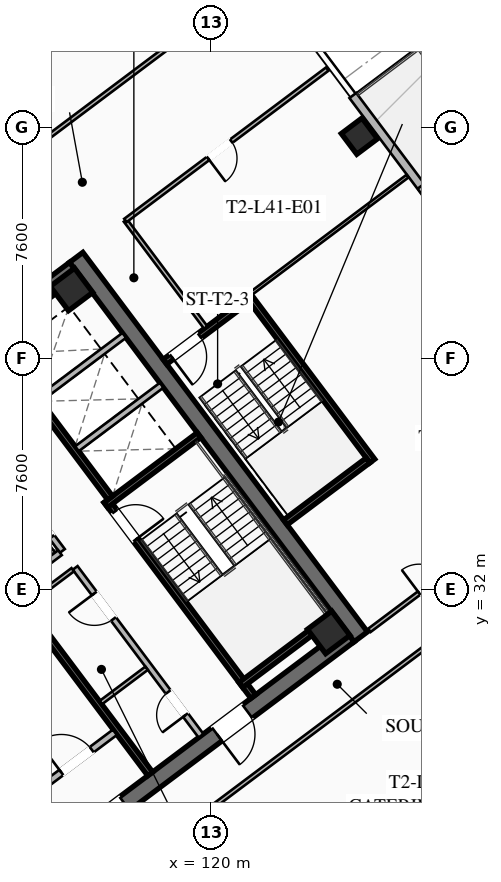
"""IFC4 building model, lengths in metres.
Left out: names, types, materials, properties, quantities, classifications, styles, units other than length and angle.
Written with IfcOpenShell. Run it as: python <this file> out.ifc"""

import sys

from ifc_helpers import new_model, si_unit, direction, frame, frame_2d, origin, origin_2d, place, context, subcontext, project, spatial, rectangle, hollow_rectangle, extrude, element, fill, save


model = new_model("IFC4")
c1 = context("Model", 3, precision=1e-05, world=origin(), true_north=direction((0.0, 1.0)))
c2 = subcontext(c1, "Body", "Model", "MODEL_VIEW")
j1 = project(units=[si_unit("LENGTHUNIT", "METRE"), si_unit("PLANEANGLEUNIT", "RADIAN")], contexts=[c1])
p1 = place(None, origin())
s1 = spatial("IfcSite", under=j1, at=p1, CompositionType="ELEMENT")
p2 = place(p1, origin())
s2 = spatial("IfcBuilding", under=s1, at=p2, CompositionType="ELEMENT")
p3 = place(p2, frame((0.0, 0.0, 153.45)))
s3 = spatial("IfcBuildingStorey", under=s2, at=p3, CompositionType="ELEMENT", Elevation=153.45)
p4 = place(p3, frame((115.564, 42.923, 0.0), z_axis=(0.0, 0.0, 1.0), x_axis=(0.600005007985, -0.799996243986, 0.0)))
e1 = element("IfcWall", 1, at=p4, inside=s3, PredefinedType="SHEAR", context=c2, shape_type="SweptSolid", body=[
    extrude(rectangle(XDim=15.6, YDim=0.55, at=frame_2d((7.8, 0.0))), origin(), (0.0, 0.0, 1.0), 3.55),
])
p5 = place(p3, frame((124.539, 30.498, 0.0), z_axis=(0.0, 0.0, 1.0), x_axis=(-0.799998054672, -0.600002593761, 0.0)))
e2 = element("IfcWall", 2, at=p5, inside=s3, PredefinedType="SHEAR", context=c2, shape_type="SweptSolid", body=[
    extrude(rectangle(XDim=15.06, YDim=0.55, at=frame_2d((7.53, 0.0))), origin(), (0.0, 0.0, 1.0), 3.55),
])
p6 = place(p5, frame((9.23, 0.0, 0.0)))
e3 = element("IfcOpeningElement", 3, at=p6, cuts=e2, PredefinedType="OPENING", context=c2, shape_type="SweptSolid", body=[
    extrude(rectangle(XDim=1.25, YDim=2.25, at=frame_2d((0.625, 1.125))), frame((0.0, 0.285, 0.0), z_axis=(0.0, -1.0, 0.0), x_axis=(1.0, 0.0, 0.0)), (0.0, 0.0, 1.0), 0.57),
])
p7 = place(p5, frame((4.18, 0.0, 0.0)))
e4 = element("IfcOpeningElement", 4, at=p7, cuts=e2, PredefinedType="OPENING", context=c2, shape_type="SweptSolid", body=[
    extrude(rectangle(XDim=1.25, YDim=2.25, at=frame_2d((0.625, 1.125))), frame((0.0, 0.285, 0.0), z_axis=(0.0, -1.0, 0.0), x_axis=(1.0, 0.0, 0.0)), (0.0, 0.0, 1.0), 0.57),
])
p8 = place(p3, frame((103.461, 33.502, 0.0), z_axis=(0.0, 0.0, 1.0), x_axis=(0.799998054672, 0.600002593761, 0.0)))
e5 = element("IfcWall", 5, at=p8, inside=s3, PredefinedType="SHEAR", context=c2, shape_type="SweptSolid", body=[
    extrude(rectangle(XDim=15.06, YDim=0.55, at=frame_2d((7.53, 0.0))), origin(), (0.0, 0.0, 1.0), 3.55),
])
p9 = place(p8, frame((4.58, 0.0, 0.0)))
e6 = element("IfcOpeningElement", 6, at=p9, cuts=e5, PredefinedType="OPENING", context=c2, shape_type="SweptSolid", body=[
    extrude(rectangle(XDim=1.25, YDim=2.25, at=frame_2d((0.625, 1.125))), frame((0.0, 0.285, 0.0), z_axis=(0.0, -1.0, 0.0), x_axis=(1.0, 0.0, 0.0)), (0.0, 0.0, 1.0), 0.57),
])
p10 = place(p8, frame((9.63, 0.0, 0.0)))
e7 = element("IfcOpeningElement", 7, at=p10, cuts=e5, PredefinedType="OPENING", context=c2, shape_type="SweptSolid", body=[
    extrude(rectangle(XDim=1.25, YDim=2.25, at=frame_2d((0.625, 1.125))), frame((0.0, 0.285, 0.0), z_axis=(0.0, -1.0, 0.0), x_axis=(1.0, 0.0, 0.0)), (0.0, 0.0, 1.0), 0.57),
])
for number, where, z_axis, x_axis in (
    (8, (123.87, 30.59, 0.0), (0.0, 0.0, 1.0), (0.8, 0.6, 0.0)),
    (9, (115.41, 41.87, 0.0), (0.0, 0.0, 1.0), (0.8, 0.6, 0.0)),
):
    element("IfcColumn", number, at=place(p3, frame(where, z_axis=z_axis, x_axis=x_axis)), inside=s3, PredefinedType="COLUMN", context=c2, shape_type="SweptSolid", body=[
        extrude(hollow_rectangle(XDim=1.0, YDim=1.0, WallThickness=0.04, at=origin_2d()), origin(), (0.0, 0.0, 1.0), 3.37),
    ])
p11 = place(p3, frame((124.88, 46.91, 0.0), z_axis=(0.0, 0.0, 1.0), x_axis=(0.799999996291, 0.600000004945, 0.0)))
e10 = element("IfcColumn", 10, at=p11, inside=s3, PredefinedType="COLUMN", context=c2, shape_type="SweptSolid", body=[
    extrude(hollow_rectangle(XDim=0.85, YDim=0.85, WallThickness=0.035, at=origin_2d()), origin(), (0.0, 0.0, 1.0), 3.37),
])
p12 = place(p3, frame((124.664, 48.248, 0.0), z_axis=(0.0, 0.0, 1.0), x_axis=(0.599994081423, -0.800004438899, 0.0)))
e11 = element("IfcWall", 11, at=p12, inside=s3, PredefinedType="SOLIDWALL", context=c2, shape_type="SweptSolid", body=[
    extrude(rectangle(XDim=13.2, YDim=0.28, at=frame_2d((6.6, 0.0))), origin(), (0.0, 0.0, 1.0), 3.37),
])
p13 = place(p12, frame((5.95, 0.0, 0.0)))
e12 = element("IfcOpeningElement", 12, at=p13, cuts=e11, PredefinedType="OPENING", context=c2, shape_type="SweptSolid", body=[
    extrude(rectangle(XDim=1.3, YDim=2.15, at=frame_2d((0.65, 1.075))), frame((0.0, 0.15, 0.0), z_axis=(0.0, -1.0, 0.0), x_axis=(1.0, 0.0, 0.0)), (0.0, 0.0, 1.0), 0.3),
])
p14 = place(p12, frame((3.732, 0.0, 0.85)))
e13 = element("IfcOpeningElement", 13, at=p14, cuts=e11, PredefinedType="OPENING", context=c2, shape_type="SweptSolid", body=[
    extrude(rectangle(XDim=1.8, YDim=1.92, at=frame_2d((0.9, 0.96))), frame((0.0, 0.15, 0.0), z_axis=(0.0, -1.0, 0.0), x_axis=(1.0, 0.0, 0.0)), (0.0, 0.0, 1.0), 0.3),
])
p15 = place(p12, frame((7.668, 0.0, 0.85)))
e14 = element("IfcOpeningElement", 14, at=p15, cuts=e11, PredefinedType="OPENING", context=c2, shape_type="SweptSolid", body=[
    extrude(rectangle(XDim=1.8, YDim=1.92, at=frame_2d((0.9, 0.96))), frame((0.0, 0.15, 0.0), z_axis=(0.0, -1.0, 0.0), x_axis=(1.0, 0.0, 0.0)), (0.0, 0.0, 1.0), 0.3),
])
p16 = place(p3, frame((116.56, 34.92, 0.0), z_axis=(0.0, 0.0, 1.0), x_axis=(0.59999029481, -0.8000072788, 0.0)))
e15 = element("IfcWall", 15, at=p16, inside=s3, PredefinedType="SHEAR", context=c2, shape_type="SweptSolid", body=[
    extrude(rectangle(XDim=8.05, YDim=0.2, at=frame_2d((4.025, 0.0))), origin(), (0.0, 0.0, 1.0), 3.37),
])
p17 = place(p16, frame((0.45, 0.0, 0.0)))
e16 = element("IfcOpeningElement", 16, at=p17, cuts=e15, PredefinedType="OPENING", context=c2, shape_type="SweptSolid", body=[
    extrude(rectangle(XDim=1.15, YDim=2.2, at=frame_2d((0.575, 1.1))), frame((0.0, 0.11, 0.0), z_axis=(0.0, -1.0, 0.0), x_axis=(1.0, 0.0, 0.0)), (0.0, 0.0, 1.0), 0.22),
])
for number, where, z_axis, x_axis in (
    (17, (116.54, 34.78, 0.0), (0.0, 0.0, 1.0), (0.8, 0.6, 0.0)),
    (18, (120.98, 28.86, 0.0), (0.0, 0.0, 1.0), (0.8, 0.6, 0.0)),
):
    element("IfcWall", number, at=place(p3, frame(where, z_axis=z_axis, x_axis=x_axis)), inside=s3, PredefinedType="SHEAR", context=c2, shape_type="SweptSolid", body=[
        extrude(rectangle(XDim=3.83, YDim=0.2, at=frame_2d((1.915, 0.0))), origin(), (0.0, 0.0, 1.0), 3.37),
    ])
p18 = place(p3, frame((117.998, 25.936, 0.0), z_axis=(0.0, 0.0, 1.0), x_axis=(-0.600002693989, 0.799997979501, 0.0)))
e19 = element("IfcWall", 19, at=p18, inside=s3, PredefinedType="SHEAR", context=c2, shape_type="SweptSolid", body=[
    extrude(rectangle(XDim=14.5, YDim=0.2, at=frame_2d((7.25, 0.0))), origin(), (0.0, 0.0, 1.0), 3.37),
])
p19 = place(p3, frame((114.316, 25.412, 0.0), z_axis=(0.0, 0.0, 1.0), x_axis=(0.800018601094, 0.59997519774, 0.0)))
e20 = element("IfcWall", 20, at=p19, inside=s3, PredefinedType="SOLIDWALL", context=c2, shape_type="SweptSolid", body=[
    extrude(rectangle(XDim=3.15, YDim=0.22, at=frame_2d((1.575, 0.0))), origin(), (0.0, 0.0, 1.0), 2.513),
])
p20 = place(p19, frame((0.95, 0.0, 0.0)))
e21 = element("IfcOpeningElement", 21, at=p20, cuts=e20, PredefinedType="OPENING", context=c2, shape_type="SweptSolid", body=[
    extrude(rectangle(XDim=1.25, YDim=2.25, at=frame_2d((0.625, 1.125))), frame((0.0, 0.12, 0.0), z_axis=(0.0, -1.0, 0.0), x_axis=(1.0, 0.0, 0.0)), (0.0, 0.0, 1.0), 0.24),
])
p21 = place(p3, frame((115.19, 23.83, 0.0), z_axis=(0.0, 0.0, 1.0), x_axis=(-0.599993943644, 0.800004542231, 0.0)))
e22 = element("IfcWall", 22, at=p21, inside=s3, PredefinedType="SHEAR", context=c2, shape_type="SweptSolid", body=[
    extrude(rectangle(XDim=6.45, YDim=0.2, at=frame_2d((3.225, 0.0))), origin(), (0.0, 0.0, 1.0), 3.37),
])
p22 = place(p21, frame((4.875, 0.0, 0.0)))
e23 = element("IfcOpeningElement", 23, at=p22, cuts=e22, PredefinedType="OPENING", context=c2, shape_type="SweptSolid", body=[
    extrude(rectangle(XDim=1.3, YDim=2.25, at=frame_2d((0.65, 1.125))), frame((0.0, 0.11, 0.0), z_axis=(0.0, -1.0, 0.0), x_axis=(1.0, 0.0, 0.0)), (0.0, 0.0, 1.0), 0.22),
])
p23 = place(p21, frame((2.875, 0.0, 0.0)))
e24 = element("IfcOpeningElement", 24, at=p23, cuts=e22, PredefinedType="OPENING", context=c2, shape_type="SweptSolid", body=[
    extrude(rectangle(XDim=1.3, YDim=2.25, at=frame_2d((0.65, 1.125))), frame((0.0, 0.11, 0.0), z_axis=(0.0, -1.0, 0.0), x_axis=(1.0, 0.0, 0.0)), (0.0, 0.0, 1.0), 0.22),
])
p24 = place(p21, frame((0.675, 0.0, 0.0)))
e25 = element("IfcOpeningElement", 25, at=p24, cuts=e22, PredefinedType="OPENING", context=c2, shape_type="SweptSolid", body=[
    extrude(rectangle(XDim=1.3, YDim=2.25, at=frame_2d((0.65, 1.125))), frame((0.0, 0.11, 0.0), z_axis=(0.0, -1.0, 0.0), x_axis=(1.0, 0.0, 0.0)), (0.0, 0.0, 1.0), 0.22),
])
p25 = place(p3, frame((112.81, 40.17, 0.0), z_axis=(0.0, 0.0, 1.0), x_axis=(0.599993943644, -0.800004542231, 0.0)))
e26 = element("IfcWall", 26, at=p25, inside=s3, PredefinedType="SHEAR", context=c2, shape_type="SweptSolid", body=[
    extrude(rectangle(XDim=6.45, YDim=0.2, at=frame_2d((3.225, 0.0))), origin(), (0.0, 0.0, 1.0), 3.37),
])
for number, where, z_axis, x_axis in (
    (27, (115.59, 36.63, 0.0), (0.0, 0.0, 1.0), (0.8, 0.6, 0.0)),
    (28, (114.36, 38.27, 0.0), (0.0, 0.0, 1.0), (0.8, 0.6, 0.0)),
):
    element("IfcWall", number, at=place(p3, frame(where, z_axis=z_axis, x_axis=x_axis)), inside=s3, PredefinedType="SOLIDWALL", context=c2, shape_type="SweptSolid", body=[
        extrude(rectangle(XDim=3.48, YDim=0.2, at=frame_2d((1.74, 0.0))), origin(), (0.0, 0.0, 1.0), 3.37),
    ])
p26 = place(p3, frame((119.67, 27.19, 0.0), z_axis=(0.0, 0.0, 1.0), x_axis=(-0.599988677396, 0.800008491828, 0.0)))
e29 = element("IfcWall", 29, at=p26, inside=s3, PredefinedType="SOLIDWALL", context=c2, shape_type="SweptSolid", body=[
    extrude(rectangle(XDim=6.9, YDim=0.2, at=frame_2d((3.45, 0.0))), origin(), (0.0, 0.0, 1.0), 2.513),
])
p27 = place(p26, frame((0.85, 0.0, 0.0)))
e30 = element("IfcOpeningElement", 30, at=p27, cuts=e29, PredefinedType="OPENING", context=c2, shape_type="SweptSolid", body=[
    extrude(rectangle(XDim=0.95, YDim=2.05, at=frame_2d((0.475, 1.025))), frame((0.0, 0.11, 0.0), z_axis=(0.0, -1.0, 0.0), x_axis=(1.0, 0.0, 0.0)), (0.0, 0.0, 1.0), 0.22),
])
p28 = place(p26, frame((4.8, 0.0, 0.0)))
e31 = element("IfcOpeningElement", 31, at=p28, cuts=e29, PredefinedType="OPENING", context=c2, shape_type="SweptSolid", body=[
    extrude(rectangle(XDim=1.05, YDim=2.2, at=frame_2d((0.525, 1.1))), frame((0.0, 0.11, 0.0), z_axis=(0.0, -1.0, 0.0), x_axis=(1.0, 0.0, 0.0)), (0.0, 0.0, 1.0), 0.22),
])
for number, where, z_axis, x_axis in (
    (32, (113.946, 31.522, 0.0), (0.0, 0.0, 1.0), (0.8, 0.6, 0.0)),
    (33, (116.376, 28.282, 0.0), (0.0, 0.0, 1.0), (0.8, 0.6, 0.0)),
):
    element("IfcWall", number, at=place(p3, frame(where, z_axis=z_axis, x_axis=x_axis)), inside=s3, PredefinedType="PARTITIONING", context=c2, shape_type="SweptSolid", body=[
        extrude(rectangle(XDim=1.88, YDim=0.135, at=frame_2d((0.94, 0.0))), origin(), (0.0, 0.0, 1.0), 2.513),
    ])
p29 = place(p3, frame((115.11, 33.27, 0.0), z_axis=(0.0, 0.0, 1.0), x_axis=(-0.600011322243, 0.799991508192, 0.0)))
e34 = element("IfcWall", 34, at=p29, inside=s3, PredefinedType="SOLIDWALL", context=c2, shape_type="SweptSolid", body=[
    extrude(rectangle(XDim=6.9, YDim=0.2, at=frame_2d((3.45, 0.0))), origin(), (0.0, 0.0, 1.0), 3.37),
])
p30 = place(p29, frame((0.575, 0.0, 0.0)))
e35 = element("IfcOpeningElement", 35, at=p30, cuts=e34, PredefinedType="OPENING", context=c2, shape_type="SweptSolid", body=[
    extrude(rectangle(XDim=1.1, YDim=2.2, at=frame_2d((0.55, 1.1))), frame((0.0, 0.11, 0.0), z_axis=(0.0, -1.0, 0.0), x_axis=(1.0, 0.0, 0.0)), (0.0, 0.0, 1.0), 0.22),
])
p31 = place(p29, frame((2.825, 0.0, 0.0)))
e36 = element("IfcOpeningElement", 36, at=p31, cuts=e34, PredefinedType="OPENING", context=c2, shape_type="SweptSolid", body=[
    extrude(rectangle(XDim=1.1, YDim=2.2, at=frame_2d((0.55, 1.1))), frame((0.0, 0.11, 0.0), z_axis=(0.0, -1.0, 0.0), x_axis=(1.0, 0.0, 0.0)), (0.0, 0.0, 1.0), 0.22),
])
p32 = place(p29, frame((5.075, 0.0, 0.0)))
e37 = element("IfcOpeningElement", 37, at=p32, cuts=e34, PredefinedType="OPENING", context=c2, shape_type="SweptSolid", body=[
    extrude(rectangle(XDim=1.1, YDim=2.2, at=frame_2d((0.55, 1.1))), frame((0.0, 0.11, 0.0), z_axis=(0.0, -1.0, 0.0), x_axis=(1.0, 0.0, 0.0)), (0.0, 0.0, 1.0), 0.22),
])
p33 = place(p3, frame((113.526, 32.082, 0.0), z_axis=(0.0, 0.0, 1.0), x_axis=(0.800046745961, 0.599937666993, 0.0)))
e38 = element("IfcWall", 38, at=p33, inside=s3, PredefinedType="SOLIDWALL", context=c2, shape_type="SweptSolid", body=[
    extrude(rectangle(XDim=1.88, YDim=0.2, at=frame_2d((0.94, 0.0))), origin(), (0.0, 0.0, 1.0), 3.37),
])
p34 = place(p3, frame((125.304, 36.228, 0.0), z_axis=(0.0, 0.0, 1.0), x_axis=(-0.59998851072, 0.800008616831, 0.0)))
e39 = element("IfcWall", 39, at=p34, inside=s3, PredefinedType="SHEAR", context=c2, shape_type="SweptSolid", body=[
    extrude(rectangle(XDim=6.8, YDim=0.2, at=frame_2d((3.4, 0.0))), origin(), (0.0, 0.0, 1.0), 3.37),
])
p35 = place(p3, frame((121.204, 41.528, 0.0), z_axis=(0.0, 0.0, 1.0), x_axis=(-0.800017232136, -0.599977023131, 0.0)))
e40 = element("IfcWall", 40, at=p35, inside=s3, PredefinedType="SHEAR", context=c2, shape_type="SweptSolid", body=[
    extrude(rectangle(XDim=3.4, YDim=0.2, at=frame_2d((1.7, 0.0))), origin(), (0.0, 0.0, 1.0), 3.37),
])
p36 = place(p35, frame((1.975, 0.0, 0.0)))
e41 = element("IfcOpeningElement", 41, at=p36, cuts=e40, PredefinedType="OPENING", context=c2, shape_type="SweptSolid", body=[
    extrude(rectangle(XDim=1.15, YDim=2.2, at=frame_2d((0.575, 1.1))), frame((0.0, 0.11, 0.0), z_axis=(0.0, -1.0, 0.0), x_axis=(1.0, 0.0, 0.0)), (0.0, 0.0, 1.0), 0.22),
])
p37 = place(p3, frame((122.444, 34.208, 0.0), z_axis=(0.0, 0.0, 1.0), x_axis=(0.79999138319, 0.600011488909, 0.0)))
e42 = element("IfcWall", 42, at=p37, inside=s3, PredefinedType="SHEAR", context=c2, shape_type="SweptSolid", body=[
    extrude(rectangle(XDim=3.4, YDim=0.2, at=frame_2d((1.7, 0.0))), origin(), (0.0, 0.0, 1.0), 3.37),
])
p38 = place(p3, frame((119.824, 40.618, 0.0), z_axis=(0.0, 0.0, 1.0), x_axis=(-0.599982243973, 0.800013316712, 0.0)))
e43 = element("IfcWall", 43, at=p38, inside=s3, PredefinedType="PARTITIONING", context=c2, shape_type="SweptSolid", body=[
    extrude(rectangle(XDim=4.4, YDim=0.135, at=frame_2d((2.2, 0.0))), origin(), (0.0, 0.0, 1.0), 2.513),
])
p39 = place(p3, frame((94.568, 31.826, 0.0), z_axis=(0.0, 0.0, 1.0), x_axis=(0.799997191971, 0.600003744021, 0.0)))
e44 = element("IfcWall", 44, at=p39, inside=s3, PredefinedType="PARTITIONING", context=c2, shape_type="SweptSolid", body=[
    extrude(rectangle(XDim=31.3, YDim=0.135, at=frame_2d((15.65, 0.0))), origin(), (0.0, 0.0, 1.0), 2.513),
])
p40 = place(p39, frame((0.3, 0.0, 0.0)))
e45 = element("IfcOpeningElement", 45, at=p40, cuts=e44, PredefinedType="OPENING", context=c2, shape_type="SweptSolid", body=[
    extrude(rectangle(XDim=0.95, YDim=2.05, at=frame_2d((0.475, 1.025))), frame((0.0, 0.077, 0.0), z_axis=(0.0, -1.0, 0.0), x_axis=(1.0, 0.0, 0.0)), (0.0, 0.0, 1.0), 0.155),
])
p41 = place(p3, frame((132.13, 33.91, 0.0), z_axis=(0.0, 0.0, 1.0), x_axis=(-0.799997191971, -0.600003744021, 0.0)))
e46 = element("IfcWall", 46, at=p41, inside=s3, PredefinedType="PARTITIONING", context=c2, shape_type="SweptSolid", body=[
    extrude(rectangle(XDim=31.3, YDim=0.135, at=frame_2d((15.65, 0.0))), origin(), (0.0, 0.0, 1.0), 2.513),
])
p42 = place(p41, frame((29.97, 0.0, 0.0)))
e47 = element("IfcOpeningElement", 47, at=p42, cuts=e46, PredefinedType="OPENING", context=c2, shape_type="SweptSolid", body=[
    extrude(rectangle(XDim=0.95, YDim=2.05, at=frame_2d((0.475, 1.025))), frame((0.0, 0.077, 0.0), z_axis=(0.0, -1.0, 0.0), x_axis=(1.0, 0.0, 0.0)), (0.0, 0.0, 1.0), 0.155),
])
p43 = place(p41, frame((0.38, 0.0, 0.0)))
e48 = element("IfcOpeningElement", 48, at=p43, cuts=e46, PredefinedType="OPENING", context=c2, shape_type="SweptSolid", body=[
    extrude(rectangle(XDim=0.95, YDim=2.05, at=frame_2d((0.475, 1.025))), frame((0.0, 0.077, 0.0), z_axis=(0.0, -1.0, 0.0), x_axis=(1.0, 0.0, 0.0)), (0.0, 0.0, 1.0), 0.155),
])
p44 = place(p3, frame((123.824, 49.118, 0.0), z_axis=(0.0, 0.0, 1.0), x_axis=(-0.799996470201, -0.60000470637, 0.0)))
e49 = element("IfcWall", 49, at=p44, inside=s3, PredefinedType="PARTITIONING", context=c2, shape_type="SweptSolid", body=[
    extrude(rectangle(XDim=8.3, YDim=0.135, at=frame_2d((4.15, 0.0))), origin(), (0.0, 0.0, 1.0), 2.513),
])
p45 = place(p44, frame((3.95, 0.0, 0.0)))
e50 = element("IfcOpeningElement", 50, at=p45, cuts=e49, PredefinedType="OPENING", context=c2, shape_type="SweptSolid", body=[
    extrude(rectangle(XDim=0.95, YDim=2.05, at=frame_2d((0.475, 1.025))), frame((0.0, 0.077, 0.0), z_axis=(0.0, -1.0, 0.0), x_axis=(1.0, 0.0, 0.0)), (0.0, 0.0, 1.0), 0.155),
])
p46 = place(p3, frame((125.208, 30.656, 0.0), z_axis=(0.0, 0.0, 1.0), x_axis=(0.800005876956, 0.599992163979, 0.0)))
e51 = element("IfcWall", 51, at=p46, inside=s3, PredefinedType="PARTITIONING", context=c2, shape_type="SweptSolid", body=[
    extrude(rectangle(XDim=9.97, YDim=0.135, at=frame_2d((4.985, 0.0))), origin(), (0.0, 0.0, 1.0), 2.513),
])
p47 = place(p46, frame((2.045, 0.0, 0.0)))
e52 = element("IfcOpeningElement", 52, at=p47, cuts=e51, PredefinedType="OPENING", context=c2, shape_type="SweptSolid", body=[
    extrude(rectangle(XDim=0.95, YDim=2.05, at=frame_2d((0.475, 1.025))), frame((0.0, 0.077, 0.0), z_axis=(0.0, -1.0, 0.0), x_axis=(1.0, 0.0, 0.0)), (0.0, 0.0, 1.0), 0.155),
])
p48 = place(p3, frame((126.464, 45.598, 0.0), z_axis=(0.0, 0.0, 1.0), x_axis=(-0.8000181681, -0.599975775102, 0.0)))
e53 = element("IfcWall", 53, at=p48, inside=s3, PredefinedType="PARTITIONING", context=c2, shape_type="SweptSolid", body=[
    extrude(rectangle(XDim=6.45, YDim=0.11, at=frame_2d((3.225, 0.0))), origin(), (0.0, 0.0, 1.0), 2.513),
])
p49 = place(p14, origin())
e54 = element("IfcWindow", 54, at=p49, inside=s3, PartitioningType="SINGLE_PANEL", PredefinedType="WINDOW", context=c2, shape_type="SweptSolid", body=[
    extrude(rectangle(XDim=1.8, YDim=1.92, at=frame_2d((0.9, 0.96))), frame((0.0, 0.03, 0.0), z_axis=(0.0, -1.0, 0.0), x_axis=(1.0, 0.0, 0.0)), (0.0, 0.0, 1.0), 0.06),
])
fill(e13, e54)
p50 = place(p7, origin())
e55 = element("IfcDoor", 55, at=p50, inside=s3, OperationType="SINGLE_SWING_RIGHT", PredefinedType="DOOR", context=c2, shape_type="SweptSolid", body=[
    extrude(rectangle(XDim=1.25, YDim=2.25, at=frame_2d((0.625, 1.125))), frame((0.0, 0.025, 0.0), z_axis=(0.0, -1.0, 0.0), x_axis=(1.0, 0.0, 0.0)), (0.0, 0.0, 1.0), 0.05),
])
fill(e4, e55)
p51 = place(p17, origin())
e56 = element("IfcDoor", 56, at=p51, inside=s3, OperationType="SINGLE_SWING_RIGHT", PredefinedType="DOOR", context=c2, shape_type="SweptSolid", body=[
    extrude(rectangle(XDim=1.15, YDim=2.2, at=frame_2d((0.575, 1.1))), frame((0.0, 0.025, 0.0), z_axis=(0.0, -1.0, 0.0), x_axis=(1.0, 0.0, 0.0)), (0.0, 0.0, 1.0), 0.05),
])
fill(e16, e56)
p52 = place(p20, origin())
e57 = element("IfcDoor", 57, at=p52, inside=s3, OperationType="SINGLE_SWING_LEFT", PredefinedType="DOOR", context=c2, shape_type="SweptSolid", body=[
    extrude(rectangle(XDim=1.25, YDim=2.25, at=frame_2d((0.625, 1.125))), frame((0.0, 0.025, 0.0), z_axis=(0.0, -1.0, 0.0), x_axis=(1.0, 0.0, 0.0)), (0.0, 0.0, 1.0), 0.05),
])
fill(e21, e57)
p53 = place(p27, origin())
e58 = element("IfcDoor", 58, at=p53, inside=s3, OperationType="SINGLE_SWING_LEFT", PredefinedType="DOOR", context=c2, shape_type="SweptSolid", body=[
    extrude(rectangle(XDim=0.95, YDim=2.05, at=frame_2d((0.475, 1.025))), frame((0.0, 0.025, 0.0), z_axis=(0.0, -1.0, 0.0), x_axis=(1.0, 0.0, 0.0)), (0.0, 0.0, 1.0), 0.05),
])
fill(e30, e58)
p54 = place(p28, origin())
e59 = element("IfcDoor", 59, at=p54, inside=s3, OperationType="SINGLE_SWING_RIGHT", PredefinedType="DOOR", context=c2, shape_type="SweptSolid", body=[
    extrude(rectangle(XDim=1.05, YDim=2.2, at=frame_2d((0.525, 1.1))), frame((0.0, 0.025, 0.0), z_axis=(0.0, -1.0, 0.0), x_axis=(1.0, 0.0, 0.0)), (0.0, 0.0, 1.0), 0.05),
])
fill(e31, e59)
p55 = place(p36, origin())
e60 = element("IfcDoor", 60, at=p55, inside=s3, OperationType="SINGLE_SWING_RIGHT", PredefinedType="DOOR", context=c2, shape_type="SweptSolid", body=[
    extrude(rectangle(XDim=1.15, YDim=2.2, at=frame_2d((0.575, 1.1))), frame((0.0, 0.025, 0.0), z_axis=(0.0, -1.0, 0.0), x_axis=(1.0, 0.0, 0.0)), (0.0, 0.0, 1.0), 0.05),
])
fill(e41, e60)
p56 = place(p45, origin())
e61 = element("IfcDoor", 61, at=p56, inside=s3, OperationType="SINGLE_SWING_RIGHT", PredefinedType="DOOR", context=c2, shape_type="SweptSolid", body=[
    extrude(rectangle(XDim=0.95, YDim=2.05, at=frame_2d((0.475, 1.025))), frame((0.0, 0.025, 0.0), z_axis=(0.0, -1.0, 0.0), x_axis=(1.0, 0.0, 0.0)), (0.0, 0.0, 1.0), 0.05),
])
fill(e50, e61)
p57 = place(p47, origin())
e62 = element("IfcDoor", 62, at=p57, inside=s3, OperationType="SINGLE_SWING_LEFT", PredefinedType="DOOR", context=c2, shape_type="SweptSolid", body=[
    extrude(rectangle(XDim=0.95, YDim=2.05, at=frame_2d((0.475, 1.025))), frame((0.0, 0.025, 0.0), z_axis=(0.0, -1.0, 0.0), x_axis=(1.0, 0.0, 0.0)), (0.0, 0.0, 1.0), 0.05),
])
fill(e52, e62)
p58 = place(p24, origin())
e63 = element("IfcDoor", 63, at=p58, inside=s3, OperationType="SLIDING_TO_LEFT", PredefinedType="DOOR", context=c2, shape_type="SweptSolid", body=[
    extrude(rectangle(XDim=1.3, YDim=2.25, at=frame_2d((0.65, 1.125))), frame((0.0, 0.025, 0.0), z_axis=(0.0, -1.0, 0.0), x_axis=(1.0, 0.0, 0.0)), (0.0, 0.0, 1.0), 0.05),
])
fill(e25, e63)
p59 = place(p30, origin())
e64 = element("IfcDoor", 64, at=p59, inside=s3, OperationType="SLIDING_TO_LEFT", PredefinedType="DOOR", context=c2, shape_type="SweptSolid", body=[
    extrude(rectangle(XDim=1.1, YDim=2.2, at=frame_2d((0.55, 1.1))), frame((0.0, 0.025, 0.0), z_axis=(0.0, -1.0, 0.0), x_axis=(1.0, 0.0, 0.0)), (0.0, 0.0, 1.0), 0.05),
])
fill(e35, e64)
save(model, sys.argv[1])
